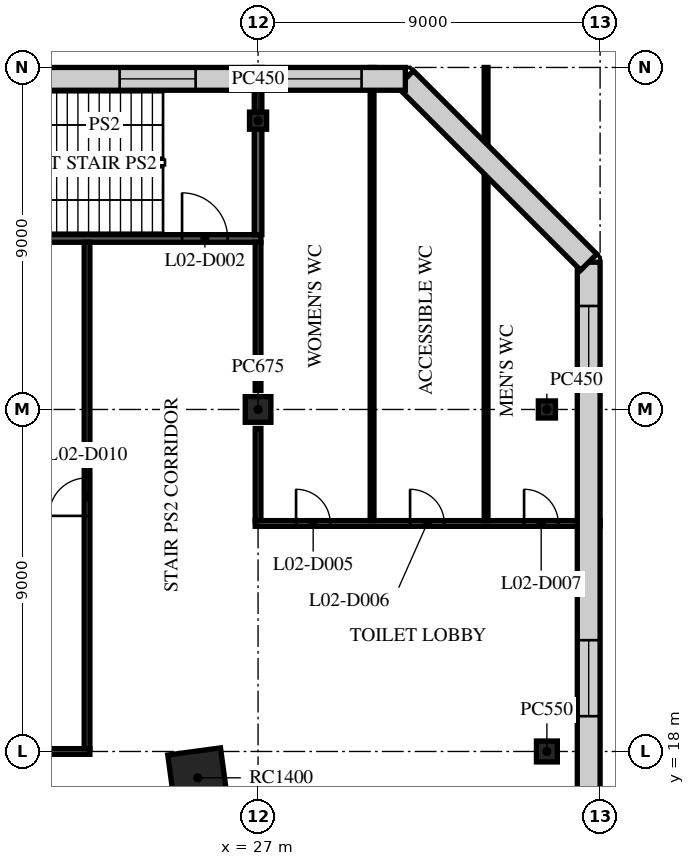
"""IFC4 building model, lengths in metres.
Left out: names, types, materials, properties, quantities, classifications, styles, units other than length and angle.
Written with IfcOpenShell. Run it as: python <this file> out.ifc"""

import sys

from ifc_helpers import new_model, si_unit, direction, frame, frame_2d, origin, origin_2d, place, context, subcontext, project, spatial, rectangle, extrude, element, fill, save


model = new_model("IFC4")
c1 = context("Model", 3, precision=1e-05, world=origin(), true_north=direction((0.0, 1.0)))
c2 = subcontext(c1, "Body", "Model", "MODEL_VIEW")
j1 = project(units=[si_unit("LENGTHUNIT", "METRE"), si_unit("PLANEANGLEUNIT", "RADIAN")], contexts=[c1])
p1 = place(None, origin())
s1 = spatial("IfcSite", under=j1, at=p1, CompositionType="ELEMENT")
p2 = place(p1, origin())
s2 = spatial("IfcBuilding", under=s1, at=p2, CompositionType="ELEMENT")
p3 = place(p2, frame((0.0, 0.0, 9.0)))
s3 = spatial("IfcBuildingStorey", under=s2, at=p3, CompositionType="ELEMENT", Elevation=9.0)
p4 = place(p3, frame((27.0, 27.0, 0.0), z_axis=(0.0, 0.0, 1.0), x_axis=(1.0, 0.0, 0.0)))
e1 = element("IfcColumn", 1, at=p4, inside=s3, PredefinedType="COLUMN", context=c2, shape_type="SweptSolid", body=[
    extrude(rectangle(XDim=0.675, YDim=0.675, at=origin_2d()), origin(), (0.0, 0.0, 1.0), 4.5),
])
p5 = place(p3, frame((27.0, 34.6, 0.0), z_axis=(0.0, 0.0, 1.0), x_axis=(1.0, 0.0, 0.0)))
e2 = element("IfcColumn", 2, at=p5, inside=s3, PredefinedType="COLUMN", context=c2, shape_type="SweptSolid", body=[
    extrude(rectangle(XDim=0.45, YDim=0.45, at=origin_2d()), origin(), (0.0, 0.0, 1.0), 4.5),
])
p6 = place(p3, frame((34.6, 18.0, 0.0), z_axis=(0.0, 0.0, 1.0), x_axis=(1.0, 0.0, 0.0)))
e3 = element("IfcColumn", 3, at=p6, inside=s3, PredefinedType="COLUMN", context=c2, shape_type="SweptSolid", body=[
    extrude(rectangle(XDim=0.55, YDim=0.55, at=origin_2d()), origin(), (0.0, 0.0, 1.0), 4.5),
])
p7 = place(p3, frame((34.6, 27.0, 0.0), z_axis=(0.0, 0.0, 1.0), x_axis=(1.0, 0.0, 0.0)))
e4 = element("IfcColumn", 4, at=p7, inside=s3, PredefinedType="COLUMN", context=c2, shape_type="SweptSolid", body=[
    extrude(rectangle(XDim=0.45, YDim=0.45, at=origin_2d()), origin(), (0.0, 0.0, 1.0), 4.5),
])
p8 = place(p3, frame((25.412, 17.307, 0.0), z_axis=(0.0, 0.0, 1.0), x_axis=(0.991001197216, 0.133853005627, 0.0)))
e5 = element("IfcColumn", 5, at=p8, inside=s3, PredefinedType="COLUMN", context=c2, shape_type="SweptSolid", body=[
    extrude(rectangle(XDim=1.4, YDim=1.4, at=origin_2d()), origin(), (0.0, 0.0, 1.0), 4.5),
])
p9 = place(p3, frame((18.5, 18.0, 0.0), z_axis=(0.0, 0.0, 1.0), x_axis=(1.0, 0.0, 0.0)))
e6 = element("IfcWall", 6, at=p9, inside=s3, PredefinedType="PARTITIONING", context=c2, shape_type="SweptSolid", body=[
    extrude(rectangle(XDim=4.075, YDim=0.15, at=frame_2d((2.038, 0.0))), origin(), (0.0, 0.0, 1.0), 4.1),
])
p10 = place(p3, frame((26.925, 24.0, 0.0), z_axis=(0.0, 0.0, 1.0), x_axis=(1.0, 0.0, 0.0)))
e7 = element("IfcWall", 7, at=p10, inside=s3, PredefinedType="PARTITIONING", context=c2, shape_type="SweptSolid", body=[
    extrude(rectangle(XDim=9.075, YDim=0.15, at=frame_2d((4.538, 0.0))), origin(), (0.0, 0.0, 1.0), 4.1),
])
p11 = place(p10, frame((1.075, 0.0, 0.0)))
e8 = element("IfcOpeningElement", 8, at=p11, cuts=e7, PredefinedType="OPENING", context=c2, shape_type="SweptSolid", body=[
    extrude(rectangle(XDim=0.9, YDim=2.1, at=frame_2d((0.45, 1.05))), frame((0.0, 0.085, 0.0), z_axis=(0.0, -1.0, 0.0), x_axis=(1.0, 0.0, 0.0)), (0.0, 0.0, 1.0), 0.17),
])
p12 = place(p10, frame((4.075, 0.0, 0.0)))
e9 = element("IfcOpeningElement", 9, at=p12, cuts=e7, PredefinedType="OPENING", context=c2, shape_type="SweptSolid", body=[
    extrude(rectangle(XDim=0.9, YDim=2.1, at=frame_2d((0.45, 1.05))), frame((0.0, 0.085, 0.0), z_axis=(0.0, -1.0, 0.0), x_axis=(1.0, 0.0, 0.0)), (0.0, 0.0, 1.0), 0.17),
])
p13 = place(p10, frame((7.075, 0.0, 0.0)))
e10 = element("IfcOpeningElement", 10, at=p13, cuts=e7, PredefinedType="OPENING", context=c2, shape_type="SweptSolid", body=[
    extrude(rectangle(XDim=0.9, YDim=2.1, at=frame_2d((0.45, 1.05))), frame((0.0, 0.085, 0.0), z_axis=(0.0, -1.0, 0.0), x_axis=(1.0, 0.0, 0.0)), (0.0, 0.0, 1.0), 0.17),
])
p14 = place(p3, frame((17.9, 31.5, 0.0), z_axis=(0.0, 0.0, 1.0), x_axis=(1.0, 0.0, 0.0)))
e11 = element("IfcWall", 11, at=p14, inside=s3, PredefinedType="PARTITIONING", context=c2, shape_type="SweptSolid", body=[
    extrude(rectangle(XDim=9.175, YDim=0.2, at=frame_2d((4.587, 0.0))), origin(), (0.0, 0.0, 1.0), 4.1),
])
p15 = place(p14, frame((7.1, 0.0, 0.0)))
e12 = element("IfcOpeningElement", 12, at=p15, cuts=e11, PredefinedType="OPENING", context=c2, shape_type="SweptSolid", body=[
    extrude(rectangle(XDim=1.2, YDim=2.1, at=frame_2d((0.6, 1.05))), frame((0.0, 0.11, 0.0), z_axis=(0.0, -1.0, 0.0), x_axis=(1.0, 0.0, 0.0)), (0.0, 0.0, 1.0), 0.22),
])
p16 = place(p3, frame((22.5, 18.075, 0.0), z_axis=(0.0, 0.0, 1.0), x_axis=(0.0, 1.0, 0.0)))
e13 = element("IfcWall", 13, at=p16, inside=s3, PredefinedType="PARTITIONING", context=c2, shape_type="SweptSolid", body=[
    extrude(rectangle(XDim=13.325, YDim=0.15, at=frame_2d((6.663, 0.0))), origin(), (0.0, 0.0, 1.0), 4.1),
])
p17 = place(p16, frame((6.125, 0.0, 0.0)))
e14 = element("IfcOpeningElement", 14, at=p17, cuts=e13, PredefinedType="OPENING", context=c2, shape_type="SweptSolid", body=[
    extrude(rectangle(XDim=1.0, YDim=2.1, at=frame_2d((0.5, 1.05))), frame((0.0, 0.085, 0.0), z_axis=(0.0, -1.0, 0.0), x_axis=(1.0, 0.0, 0.0)), (0.0, 0.0, 1.0), 0.17),
])
p18 = place(p3, frame((27.0, 24.075, 0.0), z_axis=(0.0, 0.0, 1.0), x_axis=(0.0, 1.0, 0.0)))
e15 = element("IfcWall", 15, at=p18, inside=s3, PredefinedType="PARTITIONING", context=c2, shape_type="SweptSolid", body=[
    extrude(rectangle(XDim=2.425, YDim=0.15, at=frame_2d((1.212, 0.0))), origin(), (0.0, 0.0, 1.0), 4.1),
])
p19 = place(p3, frame((27.0, 27.5, 0.0), z_axis=(0.0, 0.0, 1.0), x_axis=(0.0, 1.0, 0.0)))
e16 = element("IfcWall", 16, at=p19, inside=s3, PredefinedType="PARTITIONING", context=c2, shape_type="SweptSolid", body=[
    extrude(rectangle(XDim=3.9, YDim=0.15, at=frame_2d((1.95, 0.0))), origin(), (0.0, 0.0, 1.0), 4.1),
])
p20 = place(p3, frame((27.0, 31.6, 0.0), z_axis=(0.0, 0.0, 1.0), x_axis=(0.0, 1.0, 0.0)))
e17 = element("IfcWall", 17, at=p20, inside=s3, PredefinedType="PARTITIONING", context=c2, shape_type="SweptSolid", body=[
    extrude(rectangle(XDim=2.775, YDim=0.2, at=frame_2d((1.387, 0.0))), origin(), (0.0, 0.0, 1.0), 4.1),
])
p21 = place(p3, frame((27.0, 34.825, 0.0), z_axis=(0.0, 0.0, 1.0), x_axis=(0.0, 1.0, 0.0)))
e18 = element("IfcWall", 18, at=p21, inside=s3, PredefinedType="PARTITIONING", context=c2, shape_type="SweptSolid", body=[
    extrude(rectangle(XDim=1.175, YDim=0.2, at=frame_2d((0.587, 0.0))), origin(), (0.0, 0.0, 1.0), 4.1),
])
for number, where, z_axis, x_axis in (
    (19, (30.0, 24.075, 0.0), (0.0, 0.0, 1.0), (0.0, 1.0, 0.0)),
    (20, (33.0, 24.075, 0.0), (0.0, 0.0, 1.0), (0.0, 1.0, 0.0)),
):
    element("IfcWall", number, at=place(p3, frame(where, z_axis=z_axis, x_axis=x_axis)), inside=s3, PredefinedType="PARTITIONING", context=c2, shape_type="SweptSolid", body=[
        extrude(rectangle(XDim=11.925, YDim=0.1, at=frame_2d((5.962, 0.0))), origin(), (0.0, 0.0, 1.0), 4.1),
    ])
p22 = place(p3, frame((35.7, -30.876, 0.0), z_axis=(0.0, 0.0, 1.0), x_axis=(0.0, 1.0, 0.0)))
e21 = element("IfcWall", 21, at=p22, inside=s3, PredefinedType="STANDARD", context=c2, shape_type="SweptSolid", body=[
    extrude(rectangle(XDim=61.751, YDim=0.6, at=frame_2d((30.876, 0.0))), origin(), (0.0, 0.0, 1.0), 4.1),
])
p23 = place(p22, frame((1.152, 0.0, 0.9)))
e22 = element("IfcOpeningElement", 22, at=p23, cuts=e21, PredefinedType="OPENING", context=c2, shape_type="SweptSolid", body=[
    extrude(rectangle(XDim=2.0, YDim=3.0, at=frame_2d((1.0, 1.5))), frame((0.0, 0.31, 0.0), z_axis=(0.0, -1.0, 0.0), x_axis=(1.0, 0.0, 0.0)), (0.0, 0.0, 1.0), 0.62),
])
p24 = place(p22, frame((5.519, 0.0, 0.9)))
e23 = element("IfcOpeningElement", 23, at=p24, cuts=e21, PredefinedType="OPENING", context=c2, shape_type="SweptSolid", body=[
    extrude(rectangle(XDim=2.0, YDim=3.0, at=frame_2d((1.0, 1.5))), frame((0.0, 0.31, 0.0), z_axis=(0.0, -1.0, 0.0), x_axis=(1.0, 0.0, 0.0)), (0.0, 0.0, 1.0), 0.62),
])
p25 = place(p22, frame((9.947, 0.0, 0.9)))
e24 = element("IfcOpeningElement", 24, at=p25, cuts=e21, PredefinedType="OPENING", context=c2, shape_type="SweptSolid", body=[
    extrude(rectangle(XDim=2.0, YDim=3.0, at=frame_2d((1.0, 1.5))), frame((0.0, 0.31, 0.0), z_axis=(0.0, -1.0, 0.0), x_axis=(1.0, 0.0, 0.0)), (0.0, 0.0, 1.0), 0.62),
])
p26 = place(p22, frame((14.376, 0.0, 0.9)))
e25 = element("IfcOpeningElement", 25, at=p26, cuts=e21, PredefinedType="OPENING", context=c2, shape_type="SweptSolid", body=[
    extrude(rectangle(XDim=2.0, YDim=3.0, at=frame_2d((1.0, 1.5))), frame((0.0, 0.31, 0.0), z_axis=(0.0, -1.0, 0.0), x_axis=(1.0, 0.0, 0.0)), (0.0, 0.0, 1.0), 0.62),
])
p27 = place(p22, frame((18.804, 0.0, 0.9)))
e26 = element("IfcOpeningElement", 26, at=p27, cuts=e21, PredefinedType="OPENING", context=c2, shape_type="SweptSolid", body=[
    extrude(rectangle(XDim=2.0, YDim=3.0, at=frame_2d((1.0, 1.5))), frame((0.0, 0.31, 0.0), z_axis=(0.0, -1.0, 0.0), x_axis=(1.0, 0.0, 0.0)), (0.0, 0.0, 1.0), 0.62),
])
p28 = place(p22, frame((23.233, 0.0, 0.9)))
e27 = element("IfcOpeningElement", 27, at=p28, cuts=e21, PredefinedType="OPENING", context=c2, shape_type="SweptSolid", body=[
    extrude(rectangle(XDim=2.0, YDim=3.0, at=frame_2d((1.0, 1.5))), frame((0.0, 0.31, 0.0), z_axis=(0.0, -1.0, 0.0), x_axis=(1.0, 0.0, 0.0)), (0.0, 0.0, 1.0), 0.62),
])
p29 = place(p22, frame((27.662, 0.0, 0.9)))
e28 = element("IfcOpeningElement", 28, at=p29, cuts=e21, PredefinedType="OPENING", context=c2, shape_type="SweptSolid", body=[
    extrude(rectangle(XDim=2.0, YDim=3.0, at=frame_2d((1.0, 1.5))), frame((0.0, 0.31, 0.0), z_axis=(0.0, -1.0, 0.0), x_axis=(1.0, 0.0, 0.0)), (0.0, 0.0, 1.0), 0.62),
])
p30 = place(p22, frame((32.09, 0.0, 0.9)))
e29 = element("IfcOpeningElement", 29, at=p30, cuts=e21, PredefinedType="OPENING", context=c2, shape_type="SweptSolid", body=[
    extrude(rectangle(XDim=2.0, YDim=3.0, at=frame_2d((1.0, 1.5))), frame((0.0, 0.31, 0.0), z_axis=(0.0, -1.0, 0.0), x_axis=(1.0, 0.0, 0.0)), (0.0, 0.0, 1.0), 0.62),
])
p31 = place(p22, frame((36.519, 0.0, 0.9)))
e30 = element("IfcOpeningElement", 30, at=p31, cuts=e21, PredefinedType="OPENING", context=c2, shape_type="SweptSolid", body=[
    extrude(rectangle(XDim=2.0, YDim=3.0, at=frame_2d((1.0, 1.5))), frame((0.0, 0.31, 0.0), z_axis=(0.0, -1.0, 0.0), x_axis=(1.0, 0.0, 0.0)), (0.0, 0.0, 1.0), 0.62),
])
p32 = place(p22, frame((45.376, 0.0, 0.9)))
e31 = element("IfcOpeningElement", 31, at=p32, cuts=e21, PredefinedType="OPENING", context=c2, shape_type="SweptSolid", body=[
    extrude(rectangle(XDim=2.0, YDim=3.0, at=frame_2d((1.0, 1.5))), frame((0.0, 0.31, 0.0), z_axis=(0.0, -1.0, 0.0), x_axis=(1.0, 0.0, 0.0)), (0.0, 0.0, 1.0), 0.62),
])
p33 = place(p22, frame((49.804, 0.0, 0.9)))
e32 = element("IfcOpeningElement", 32, at=p33, cuts=e21, PredefinedType="OPENING", context=c2, shape_type="SweptSolid", body=[
    extrude(rectangle(XDim=2.0, YDim=3.0, at=frame_2d((1.0, 1.5))), frame((0.0, 0.31, 0.0), z_axis=(0.0, -1.0, 0.0), x_axis=(1.0, 0.0, 0.0)), (0.0, 0.0, 1.0), 0.62),
])
p34 = place(p22, frame((58.599, 0.0, 0.9)))
e33 = element("IfcOpeningElement", 33, at=p34, cuts=e21, PredefinedType="OPENING", context=c2, shape_type="SweptSolid", body=[
    extrude(rectangle(XDim=2.0, YDim=3.0, at=frame_2d((1.0, 1.5))), frame((0.0, 0.31, 0.0), z_axis=(0.0, -1.0, 0.0), x_axis=(1.0, 0.0, 0.0)), (0.0, 0.0, 1.0), 0.62),
])
p35 = place(p3, frame((35.7, 30.876, 0.0), z_axis=(0.0, 0.0, 1.0), x_axis=(-0.707106781187, 0.707106781187, 0.0)))
e34 = element("IfcWall", 34, at=p35, inside=s3, PredefinedType="STANDARD", context=c2, shape_type="SweptSolid", body=[
    extrude(rectangle(XDim=6.823, YDim=0.6, at=frame_2d((3.411, 0.0))), origin(), (0.0, 0.0, 1.0), 4.1),
])
p36 = place(p3, frame((30.876, 35.7, 0.0), z_axis=(0.0, 0.0, 1.0), x_axis=(-1.0, 0.0, 0.0)))
e35 = element("IfcWall", 35, at=p36, inside=s3, PredefinedType="STANDARD", context=c2, shape_type="SweptSolid", body=[
    extrude(rectangle(XDim=61.751, YDim=0.6, at=frame_2d((30.876, 0.0))), origin(), (0.0, 0.0, 1.0), 4.1),
])
p37 = place(p36, frame((1.152, 0.0, 0.9)))
e36 = element("IfcOpeningElement", 36, at=p37, cuts=e35, PredefinedType="OPENING", context=c2, shape_type="SweptSolid", body=[
    extrude(rectangle(XDim=2.0, YDim=3.0, at=frame_2d((1.0, 1.5))), frame((0.0, 0.31, 0.0), z_axis=(0.0, -1.0, 0.0), x_axis=(1.0, 0.0, 0.0)), (0.0, 0.0, 1.0), 0.62),
])
p38 = place(p36, frame((5.519, 0.0, 0.9)))
e37 = element("IfcOpeningElement", 37, at=p38, cuts=e35, PredefinedType="OPENING", context=c2, shape_type="SweptSolid", body=[
    extrude(rectangle(XDim=2.0, YDim=3.0, at=frame_2d((1.0, 1.5))), frame((0.0, 0.31, 0.0), z_axis=(0.0, -1.0, 0.0), x_axis=(1.0, 0.0, 0.0)), (0.0, 0.0, 1.0), 0.62),
])
p39 = place(p36, frame((9.947, 0.0, 0.9)))
e38 = element("IfcOpeningElement", 38, at=p39, cuts=e35, PredefinedType="OPENING", context=c2, shape_type="SweptSolid", body=[
    extrude(rectangle(XDim=2.0, YDim=3.0, at=frame_2d((1.0, 1.5))), frame((0.0, 0.31, 0.0), z_axis=(0.0, -1.0, 0.0), x_axis=(1.0, 0.0, 0.0)), (0.0, 0.0, 1.0), 0.62),
])
p40 = place(p36, frame((14.376, 0.0, 0.9)))
e39 = element("IfcOpeningElement", 39, at=p40, cuts=e35, PredefinedType="OPENING", context=c2, shape_type="SweptSolid", body=[
    extrude(rectangle(XDim=2.0, YDim=3.0, at=frame_2d((1.0, 1.5))), frame((0.0, 0.31, 0.0), z_axis=(0.0, -1.0, 0.0), x_axis=(1.0, 0.0, 0.0)), (0.0, 0.0, 1.0), 0.62),
])
p41 = place(p36, frame((18.804, 0.0, 0.9)))
e40 = element("IfcOpeningElement", 40, at=p41, cuts=e35, PredefinedType="OPENING", context=c2, shape_type="SweptSolid", body=[
    extrude(rectangle(XDim=2.0, YDim=3.0, at=frame_2d((1.0, 1.5))), frame((0.0, 0.31, 0.0), z_axis=(0.0, -1.0, 0.0), x_axis=(1.0, 0.0, 0.0)), (0.0, 0.0, 1.0), 0.62),
])
p42 = place(p36, frame((23.233, 0.0, 0.9)))
e41 = element("IfcOpeningElement", 41, at=p42, cuts=e35, PredefinedType="OPENING", context=c2, shape_type="SweptSolid", body=[
    extrude(rectangle(XDim=2.0, YDim=3.0, at=frame_2d((1.0, 1.5))), frame((0.0, 0.31, 0.0), z_axis=(0.0, -1.0, 0.0), x_axis=(1.0, 0.0, 0.0)), (0.0, 0.0, 1.0), 0.62),
])
p43 = place(p36, frame((27.662, 0.0, 0.9)))
e42 = element("IfcOpeningElement", 42, at=p43, cuts=e35, PredefinedType="OPENING", context=c2, shape_type="SweptSolid", body=[
    extrude(rectangle(XDim=2.0, YDim=3.0, at=frame_2d((1.0, 1.5))), frame((0.0, 0.31, 0.0), z_axis=(0.0, -1.0, 0.0), x_axis=(1.0, 0.0, 0.0)), (0.0, 0.0, 1.0), 0.62),
])
p44 = place(p36, frame((32.09, 0.0, 0.9)))
e43 = element("IfcOpeningElement", 43, at=p44, cuts=e35, PredefinedType="OPENING", context=c2, shape_type="SweptSolid", body=[
    extrude(rectangle(XDim=2.0, YDim=3.0, at=frame_2d((1.0, 1.5))), frame((0.0, 0.31, 0.0), z_axis=(0.0, -1.0, 0.0), x_axis=(1.0, 0.0, 0.0)), (0.0, 0.0, 1.0), 0.62),
])
p45 = place(p36, frame((36.519, 0.0, 0.9)))
e44 = element("IfcOpeningElement", 44, at=p45, cuts=e35, PredefinedType="OPENING", context=c2, shape_type="SweptSolid", body=[
    extrude(rectangle(XDim=2.0, YDim=3.0, at=frame_2d((1.0, 1.5))), frame((0.0, 0.31, 0.0), z_axis=(0.0, -1.0, 0.0), x_axis=(1.0, 0.0, 0.0)), (0.0, 0.0, 1.0), 0.62),
])
p46 = place(p36, frame((40.947, 0.0, 0.9)))
e45 = element("IfcOpeningElement", 45, at=p46, cuts=e35, PredefinedType="OPENING", context=c2, shape_type="SweptSolid", body=[
    extrude(rectangle(XDim=2.0, YDim=3.0, at=frame_2d((1.0, 1.5))), frame((0.0, 0.31, 0.0), z_axis=(0.0, -1.0, 0.0), x_axis=(1.0, 0.0, 0.0)), (0.0, 0.0, 1.0), 0.62),
])
p47 = place(p36, frame((45.376, 0.0, 0.9)))
e46 = element("IfcOpeningElement", 46, at=p47, cuts=e35, PredefinedType="OPENING", context=c2, shape_type="SweptSolid", body=[
    extrude(rectangle(XDim=2.0, YDim=3.0, at=frame_2d((1.0, 1.5))), frame((0.0, 0.31, 0.0), z_axis=(0.0, -1.0, 0.0), x_axis=(1.0, 0.0, 0.0)), (0.0, 0.0, 1.0), 0.62),
])
p48 = place(p36, frame((49.804, 0.0, 0.9)))
e47 = element("IfcOpeningElement", 47, at=p48, cuts=e35, PredefinedType="OPENING", context=c2, shape_type="SweptSolid", body=[
    extrude(rectangle(XDim=2.0, YDim=3.0, at=frame_2d((1.0, 1.5))), frame((0.0, 0.31, 0.0), z_axis=(0.0, -1.0, 0.0), x_axis=(1.0, 0.0, 0.0)), (0.0, 0.0, 1.0), 0.62),
])
p49 = place(p36, frame((54.233, 0.0, 0.9)))
e48 = element("IfcOpeningElement", 48, at=p49, cuts=e35, PredefinedType="OPENING", context=c2, shape_type="SweptSolid", body=[
    extrude(rectangle(XDim=2.0, YDim=3.0, at=frame_2d((1.0, 1.5))), frame((0.0, 0.31, 0.0), z_axis=(0.0, -1.0, 0.0), x_axis=(1.0, 0.0, 0.0)), (0.0, 0.0, 1.0), 0.62),
])
p50 = place(p36, frame((58.599, 0.0, 0.9)))
e49 = element("IfcOpeningElement", 49, at=p50, cuts=e35, PredefinedType="OPENING", context=c2, shape_type="SweptSolid", body=[
    extrude(rectangle(XDim=2.0, YDim=3.0, at=frame_2d((1.0, 1.5))), frame((0.0, 0.31, 0.0), z_axis=(0.0, -1.0, 0.0), x_axis=(1.0, 0.0, 0.0)), (0.0, 0.0, 1.0), 0.62),
])
p51 = place(p15, origin())
e50 = element("IfcDoor", 50, at=p51, inside=s3, OperationType="SINGLE_SWING_RIGHT", PredefinedType="DOOR", context=c2, shape_type="SweptSolid", body=[
    extrude(rectangle(XDim=1.2, YDim=2.1, at=frame_2d((0.6, 1.05))), frame((0.0, 0.025, 0.0), z_axis=(0.0, -1.0, 0.0), x_axis=(1.0, 0.0, 0.0)), (0.0, 0.0, 1.0), 0.05),
])
fill(e12, e50)
p52 = place(p11, origin())
e51 = element("IfcDoor", 51, at=p52, inside=s3, OperationType="SINGLE_SWING_LEFT", PredefinedType="DOOR", context=c2, shape_type="SweptSolid", body=[
    extrude(rectangle(XDim=0.9, YDim=2.1, at=frame_2d((0.45, 1.05))), frame((0.0, 0.025, 0.0), z_axis=(0.0, -1.0, 0.0), x_axis=(1.0, 0.0, 0.0)), (0.0, 0.0, 1.0), 0.05),
])
fill(e8, e51)
p53 = place(p12, origin())
e52 = element("IfcDoor", 52, at=p53, inside=s3, OperationType="SINGLE_SWING_RIGHT", PredefinedType="DOOR", context=c2, shape_type="SweptSolid", body=[
    extrude(rectangle(XDim=0.9, YDim=2.1, at=frame_2d((0.45, 1.05))), frame((0.0, 0.025, 0.0), z_axis=(0.0, -1.0, 0.0), x_axis=(1.0, 0.0, 0.0)), (0.0, 0.0, 1.0), 0.05),
])
fill(e9, e52)
p54 = place(p13, origin())
e53 = element("IfcDoor", 53, at=p54, inside=s3, OperationType="SINGLE_SWING_LEFT", PredefinedType="DOOR", context=c2, shape_type="SweptSolid", body=[
    extrude(rectangle(XDim=0.9, YDim=2.1, at=frame_2d((0.45, 1.05))), frame((0.0, 0.025, 0.0), z_axis=(0.0, -1.0, 0.0), x_axis=(1.0, 0.0, 0.0)), (0.0, 0.0, 1.0), 0.05),
])
fill(e10, e53)
p55 = place(p17, origin())
e54 = element("IfcDoor", 54, at=p55, inside=s3, OperationType="SINGLE_SWING_RIGHT", PredefinedType="DOOR", context=c2, shape_type="SweptSolid", body=[
    extrude(rectangle(XDim=1.0, YDim=2.1, at=frame_2d((0.5, 1.05))), frame((0.0, 0.025, 0.0), z_axis=(0.0, -1.0, 0.0), x_axis=(1.0, 0.0, 0.0)), (0.0, 0.0, 1.0), 0.05),
])
fill(e14, e54)
p56 = place(p33, origin())
e55 = element("IfcWindow", 55, at=p56, inside=s3, PartitioningType="SINGLE_PANEL", PredefinedType="WINDOW", context=c2, shape_type="SweptSolid", body=[
    extrude(rectangle(XDim=2.0, YDim=3.0, at=frame_2d((1.0, 1.5))), frame((0.0, 0.03, 0.0), z_axis=(0.0, -1.0, 0.0), x_axis=(1.0, 0.0, 0.0)), (0.0, 0.0, 1.0), 0.06),
])
fill(e32, e55)
p57 = place(p34, origin())
e56 = element("IfcWindow", 56, at=p57, inside=s3, PartitioningType="SINGLE_PANEL", PredefinedType="WINDOW", context=c2, shape_type="SweptSolid", body=[
    extrude(rectangle(XDim=2.0, YDim=3.0, at=frame_2d((1.0, 1.5))), frame((0.0, 0.03, 0.0), z_axis=(0.0, -1.0, 0.0), x_axis=(1.0, 0.0, 0.0)), (0.0, 0.0, 1.0), 0.06),
])
fill(e33, e56)
p58 = place(p37, origin())
e57 = element("IfcWindow", 57, at=p58, inside=s3, PartitioningType="SINGLE_PANEL", PredefinedType="WINDOW", context=c2, shape_type="SweptSolid", body=[
    extrude(rectangle(XDim=2.0, YDim=3.0, at=frame_2d((1.0, 1.5))), frame((0.0, 0.03, 0.0), z_axis=(0.0, -1.0, 0.0), x_axis=(1.0, 0.0, 0.0)), (0.0, 0.0, 1.0), 0.06),
])
fill(e36, e57)
p59 = place(p38, origin())
e58 = element("IfcWindow", 58, at=p59, inside=s3, PartitioningType="SINGLE_PANEL", PredefinedType="WINDOW", context=c2, shape_type="SweptSolid", body=[
    extrude(rectangle(XDim=2.0, YDim=3.0, at=frame_2d((1.0, 1.5))), frame((0.0, 0.03, 0.0), z_axis=(0.0, -1.0, 0.0), x_axis=(1.0, 0.0, 0.0)), (0.0, 0.0, 1.0), 0.06),
])
fill(e37, e58)
save(model, sys.argv[1])
